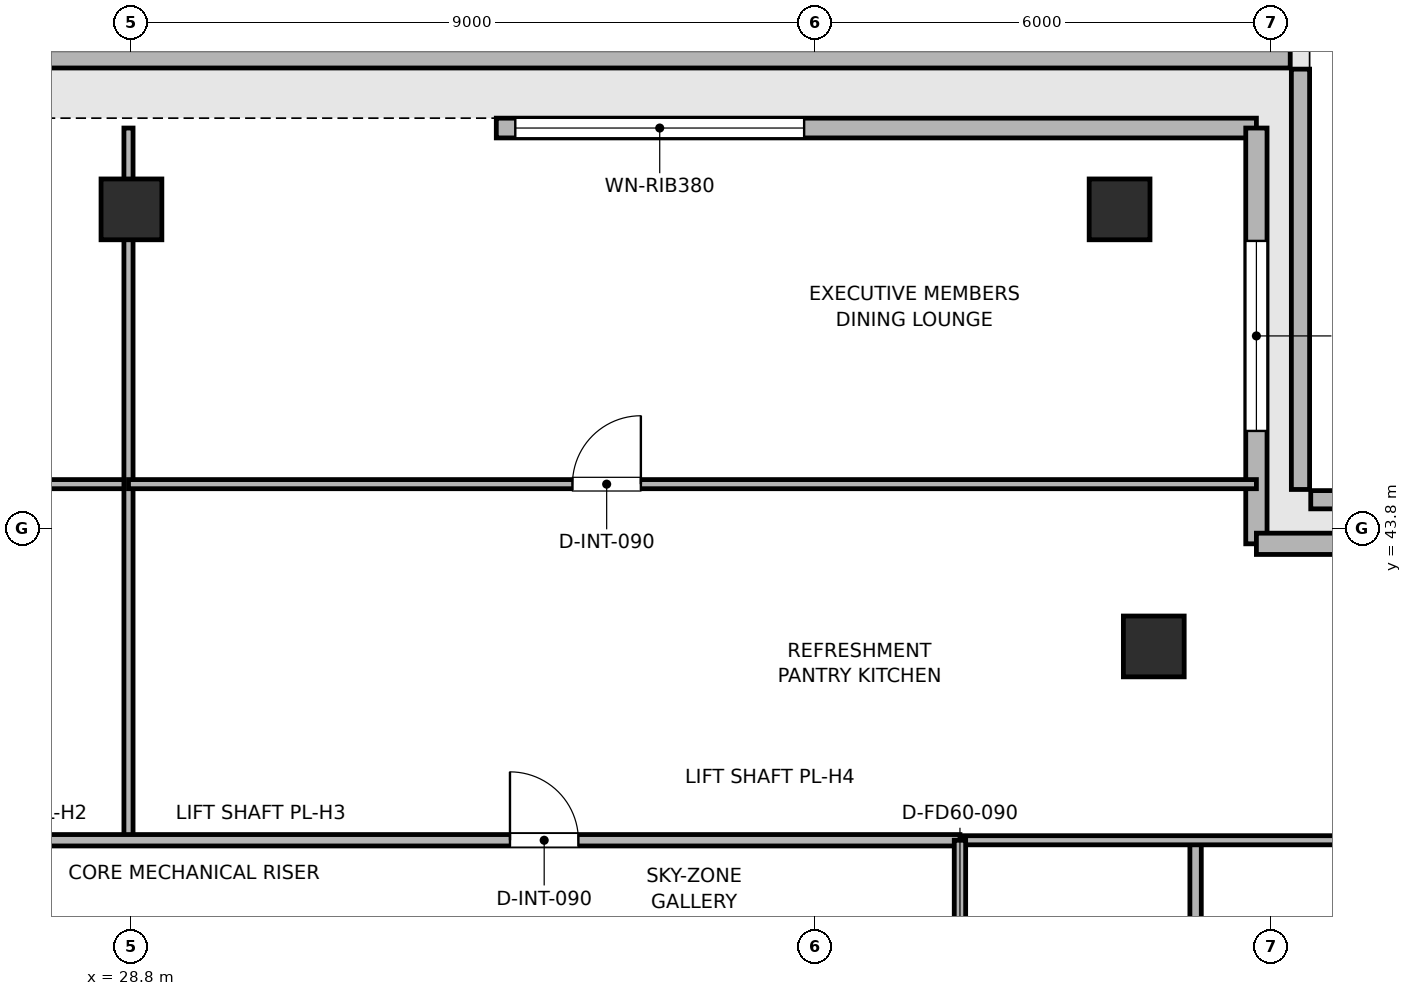
"""IFC4 building model, lengths in metres.
Left out: names, types, materials, properties, quantities, classifications, styles, units other than length and angle.
Written with IfcOpenShell. Run it as: python <this file> out.ifc"""

import sys

from ifc_helpers import new_model, si_unit, direction, frame, frame_2d, origin, origin_2d, place, context, subcontext, project, spatial, rectangle, extrude, element, fill, save


model = new_model("IFC4")
c1 = context("Model", 3, precision=1e-05, world=origin(), true_north=direction((0.0, 1.0)))
c2 = subcontext(c1, "Body", "Model", "MODEL_VIEW")
j1 = project(units=[si_unit("LENGTHUNIT", "METRE"), si_unit("PLANEANGLEUNIT", "RADIAN")], contexts=[c1])
p1 = place(None, origin())
s1 = spatial("IfcSite", under=j1, at=p1, CompositionType="ELEMENT")
p2 = place(p1, origin())
s2 = spatial("IfcBuilding", under=s1, at=p2, CompositionType="ELEMENT")
p3 = place(p2, frame((0.0, 0.0, 355.5)))
s3 = spatial("IfcBuildingStorey", under=s2, at=p3, CompositionType="ELEMENT", Elevation=355.5)
for number, where, z_axis, x_axis in (
    (1, (41.8, 48.0, 0.003), (0.0, 0.0, 1.0), (1.0, 0.0, 0.0)),
    (2, (28.8, 48.0, 0.003), (0.0, 0.0, 1.0), (1.0, 0.0, 0.0)),
    (3, (42.25, 42.25, 0.003), (0.0, 0.0, 1.0), (1.0, 0.0, 0.0)),
):
    element("IfcColumn", number, at=place(p3, frame(where, z_axis=z_axis, x_axis=x_axis)), inside=s3, PredefinedType="COLUMN", context=c2, shape_type="SweptSolid", body=[
        extrude(rectangle(XDim=0.8, YDim=0.8, at=origin_2d()), origin(), (0.0, 0.0, 1.0), 4.234),
    ])
for number, where, z_axis, x_axis in (
    (4, (49.845, 44.18, 0.0), (0.0, 0.0, 1.0), (-1.0, 0.0, 0.0)),
    (5, (44.18, 44.315, 0.0), (0.0, 0.0, 1.0), (0.0, 1.0, 0.0)),
):
    element("IfcWall", number, at=place(p3, frame(where, z_axis=z_axis, x_axis=x_axis)), inside=s3, PredefinedType="PARAPET", context=c2, shape_type="SweptSolid", body=[
        extrude(rectangle(XDim=5.53, YDim=0.24, at=frame_2d((2.765, 0.0))), origin(), (0.0, 0.0, 1.0), 1.2),
    ])
p4 = place(p3, frame((44.045, 49.98, 0.0), z_axis=(0.0, 0.0, 1.0), x_axis=(-1.0, 0.0, 0.0)))
e6 = element("IfcWall", 6, at=p4, inside=s3, PredefinedType="PARAPET", context=c2, shape_type="SweptSolid", body=[
    extrude(rectangle(XDim=30.49, YDim=0.24, at=frame_2d((15.245, 0.0))), origin(), (0.0, 0.0, 1.0), 1.2),
])
p5 = place(p3, frame((33.6, 49.07, 0.0), z_axis=(0.0, 0.0, 1.0), x_axis=(1.0, 0.0, 0.0)))
e7 = element("IfcWall", 7, at=p5, inside=s3, PredefinedType="SOLIDWALL", context=c2, shape_type="SweptSolid", body=[
    extrude(rectangle(XDim=10.0, YDim=0.26, at=frame_2d((5.0, 0.0))), origin(), (0.0, 0.0, 1.0), 4.24),
])
p6 = place(p5, frame((0.25, 0.0, 0.9)))
e8 = element("IfcOpeningElement", 8, at=p6, cuts=e7, PredefinedType="OPENING", context=c2, shape_type="SweptSolid", body=[
    extrude(rectangle(XDim=3.8, YDim=1.9, at=frame_2d((1.9, 0.95))), frame((0.0, 0.14, 0.0), z_axis=(0.0, -1.0, 0.0), x_axis=(1.0, 0.0, 0.0)), (0.0, 0.0, 1.0), 0.28),
])
p7 = place(p3, frame((43.6, 49.07, 0.0), z_axis=(0.0, 0.0, 1.0), x_axis=(0.0, -1.0, 0.0)))
e9 = element("IfcWall", 9, at=p7, inside=s3, PredefinedType="SOLIDWALL", context=c2, shape_type="SweptSolid", body=[
    extrude(rectangle(XDim=5.47, YDim=0.28, at=frame_2d((2.735, 0.0))), origin(), (0.0, 0.0, 1.0), 4.24),
])
p8 = place(p7, frame((1.485, 0.0, 0.9)))
e10 = element("IfcOpeningElement", 10, at=p8, cuts=e9, PredefinedType="OPENING", context=c2, shape_type="SweptSolid", body=[
    extrude(rectangle(XDim=2.5, YDim=1.9, at=frame_2d((1.25, 0.95))), frame((0.0, 0.15, 0.0), z_axis=(0.0, -1.0, 0.0), x_axis=(1.0, 0.0, 0.0)), (0.0, 0.0, 1.0), 0.3),
])
p9 = place(p3, frame((43.6, 43.6, 0.0), z_axis=(0.0, 0.0, 1.0), x_axis=(1.0, 0.0, 0.0)))
e11 = element("IfcWall", 11, at=p9, inside=s3, PredefinedType="SOLIDWALL", context=c2, shape_type="SweptSolid", body=[
    extrude(rectangle(XDim=5.47, YDim=0.28, at=frame_2d((2.735, 0.0))), origin(), (0.0, 0.0, 1.0), 4.24),
])
p10 = place(p9, frame((1.485, 0.0, 0.9)))
e12 = element("IfcOpeningElement", 12, at=p10, cuts=e11, PredefinedType="OPENING", context=c2, shape_type="SweptSolid", body=[
    extrude(rectangle(XDim=2.5, YDim=1.9, at=frame_2d((1.25, 0.95))), frame((0.0, 0.15, 0.0), z_axis=(0.0, -1.0, 0.0), x_axis=(1.0, 0.0, 0.0)), (0.0, 0.0, 1.0), 0.3),
])
p11 = place(p3, frame((20.33, 44.385, 0.0), z_axis=(0.0, 0.0, 1.0), x_axis=(1.0, 0.0, 0.0)))
e13 = element("IfcWall", 13, at=p11, inside=s3, PredefinedType="PARTITIONING", context=c2, shape_type="SweptSolid", body=[
    extrude(rectangle(XDim=8.431, YDim=0.12, at=frame_2d((4.215, 0.0))), origin(), (0.0, 0.0, 1.0), 3.825),
])
p12 = place(p11, frame((1.686, 0.0, 0.0)))
e14 = element("IfcOpeningElement", 14, at=p12, cuts=e13, PredefinedType="OPENING", context=c2, shape_type="SweptSolid", body=[
    extrude(rectangle(XDim=0.9, YDim=2.1, at=frame_2d((0.45, 1.05))), frame((0.0, 0.07, 0.0), z_axis=(0.0, -1.0, 0.0), x_axis=(1.0, 0.0, 0.0)), (0.0, 0.0, 1.0), 0.14),
])
p13 = place(p3, frame((28.761, 39.7, 0.0), z_axis=(0.0, 0.0, 1.0), x_axis=(0.0, 1.0, 0.0)))
e15 = element("IfcWall", 15, at=p13, inside=s3, PredefinedType="PARTITIONING", context=c2, shape_type="SweptSolid", body=[
    extrude(rectangle(XDim=9.37, YDim=0.12, at=frame_2d((4.685, 0.0))), origin(), (0.0, 0.0, 1.0), 3.825),
])
p14 = place(p3, frame((28.761, 44.385, 0.0), z_axis=(0.0, 0.0, 1.0), x_axis=(1.0, 0.0, 0.0)))
e16 = element("IfcWall", 16, at=p14, inside=s3, PredefinedType="PARTITIONING", context=c2, shape_type="SweptSolid", body=[
    extrude(rectangle(XDim=14.839, YDim=0.12, at=frame_2d((7.419, 0.0))), origin(), (0.0, 0.0, 1.0), 3.825),
])
p15 = place(p14, frame((5.841, 0.0, 0.0)))
e17 = element("IfcOpeningElement", 17, at=p15, cuts=e16, PredefinedType="OPENING", context=c2, shape_type="SweptSolid", body=[
    extrude(rectangle(XDim=0.9, YDim=2.1, at=frame_2d((0.45, 1.05))), frame((0.0, 0.07, 0.0), z_axis=(0.0, -1.0, 0.0), x_axis=(1.0, 0.0, 0.0)), (0.0, 0.0, 1.0), 0.14),
])
p16 = place(p3, frame((42.8, 28.0, 0.0), z_axis=(0.0, 0.0, 1.0), x_axis=(0.0, 1.0, 0.0)))
e18 = element("IfcWall", 18, at=p16, inside=s3, PredefinedType="PARTITIONING", context=c2, shape_type="SweptSolid", body=[
    extrude(rectangle(XDim=11.7, YDim=0.15, at=frame_2d((5.85, 0.0))), origin(), (0.0, 0.0, 1.0), 3.825),
])
p17 = place(p16, frame((9.6, 0.0, 0.0)))
e19 = element("IfcOpeningElement", 19, at=p17, cuts=e18, PredefinedType="OPENING", context=c2, shape_type="SweptSolid", body=[
    extrude(rectangle(XDim=0.9, YDim=2.1, at=frame_2d((0.45, 1.05))), frame((0.0, 0.085, 0.0), z_axis=(0.0, -1.0, 0.0), x_axis=(1.0, 0.0, 0.0)), (0.0, 0.0, 1.0), 0.17),
])
p18 = place(p3, frame((39.7, 39.7, 0.0), z_axis=(0.0, 0.0, 1.0), x_axis=(1.0, 0.0, 0.0)))
e20 = element("IfcWall", 20, at=p18, inside=s3, PredefinedType="PARTITIONING", context=c2, shape_type="SweptSolid", body=[
    extrude(rectangle(XDim=9.37, YDim=0.12, at=frame_2d((4.685, 0.0))), origin(), (0.0, 0.0, 1.0), 3.825),
])
p19 = place(p3, frame((17.9, 39.7, 0.0), z_axis=(0.0, 0.0, 1.0), x_axis=(1.0, 0.0, 0.0)))
e21 = element("IfcWall", 21, at=p19, inside=s3, PredefinedType="PARTITIONING", context=c2, shape_type="SweptSolid", body=[
    extrude(rectangle(XDim=21.8, YDim=0.15, at=frame_2d((10.9, 0.0))), origin(), (0.0, 0.0, 1.0), 3.825),
])
p20 = place(p19, frame((0.765, 0.0, 0.0)))
e22 = element("IfcOpeningElement", 22, at=p20, cuts=e21, PredefinedType="OPENING", context=c2, shape_type="SweptSolid", body=[
    extrude(rectangle(XDim=0.9, YDim=2.1, at=frame_2d((0.45, 1.05))), frame((0.0, 0.085, 0.0), z_axis=(0.0, -1.0, 0.0), x_axis=(1.0, 0.0, 0.0)), (0.0, 0.0, 1.0), 0.17),
])
p21 = place(p19, frame((6.195, 0.0, 0.0)))
e23 = element("IfcOpeningElement", 23, at=p21, cuts=e21, PredefinedType="OPENING", context=c2, shape_type="SweptSolid", body=[
    extrude(rectangle(XDim=0.9, YDim=2.1, at=frame_2d((0.45, 1.05))), frame((0.0, 0.085, 0.0), z_axis=(0.0, -1.0, 0.0), x_axis=(1.0, 0.0, 0.0)), (0.0, 0.0, 1.0), 0.17),
])
p22 = place(p19, frame((15.88, 0.0, 0.0)))
e24 = element("IfcOpeningElement", 24, at=p22, cuts=e21, PredefinedType="OPENING", context=c2, shape_type="SweptSolid", body=[
    extrude(rectangle(XDim=0.9, YDim=2.1, at=frame_2d((0.45, 1.05))), frame((0.0, 0.085, 0.0), z_axis=(0.0, -1.0, 0.0), x_axis=(1.0, 0.0, 0.0)), (0.0, 0.0, 1.0), 0.17),
])
p23 = place(p3, frame((39.7, 24.4, 0.0), z_axis=(0.0, 0.0, 1.0), x_axis=(0.0, 1.0, 0.0)))
e25 = element("IfcWall", 25, at=p23, inside=s3, PredefinedType="PARTITIONING", context=c2, shape_type="SweptSolid", body=[
    extrude(rectangle(XDim=15.3, YDim=0.15, at=frame_2d((7.65, 0.0))), origin(), (0.0, 0.0, 1.0), 3.825),
])
p24 = place(p23, frame((1.35, 0.0, 0.0)))
e26 = element("IfcOpeningElement", 26, at=p24, cuts=e25, PredefinedType="OPENING", context=c2, shape_type="SweptSolid", body=[
    extrude(rectangle(XDim=0.9, YDim=2.1, at=frame_2d((0.45, 1.05))), frame((0.0, 0.085, 0.0), z_axis=(0.0, -1.0, 0.0), x_axis=(1.0, 0.0, 0.0)), (0.0, 0.0, 1.0), 0.17),
])
p25 = place(p23, frame((4.55, 0.0, 0.0)))
e27 = element("IfcOpeningElement", 27, at=p25, cuts=e25, PredefinedType="OPENING", context=c2, shape_type="SweptSolid", body=[
    extrude(rectangle(XDim=0.9, YDim=2.1, at=frame_2d((0.45, 1.05))), frame((0.0, 0.085, 0.0), z_axis=(0.0, -1.0, 0.0), x_axis=(1.0, 0.0, 0.0)), (0.0, 0.0, 1.0), 0.17),
])
p26 = place(p23, frame((7.45, 0.0, 0.0)))
e28 = element("IfcOpeningElement", 28, at=p26, cuts=e25, PredefinedType="OPENING", context=c2, shape_type="SweptSolid", body=[
    extrude(rectangle(XDim=0.9, YDim=2.1, at=frame_2d((0.45, 1.05))), frame((0.0, 0.085, 0.0), z_axis=(0.0, -1.0, 0.0), x_axis=(1.0, 0.0, 0.0)), (0.0, 0.0, 1.0), 0.17),
])
p27 = place(p23, frame((10.2, 0.0, 0.0)))
e29 = element("IfcOpeningElement", 29, at=p27, cuts=e25, PredefinedType="OPENING", context=c2, shape_type="SweptSolid", body=[
    extrude(rectangle(XDim=0.95, YDim=2.1, at=frame_2d((0.475, 1.05))), frame((0.0, 0.085, 0.0), z_axis=(0.0, -1.0, 0.0), x_axis=(1.0, 0.0, 0.0)), (0.0, 0.0, 1.0), 0.17),
])
p28 = place(p23, frame((13.2, 0.0, 0.0)))
e30 = element("IfcOpeningElement", 30, at=p28, cuts=e25, PredefinedType="OPENING", context=c2, shape_type="SweptSolid", body=[
    extrude(rectangle(XDim=0.9, YDim=2.1, at=frame_2d((0.45, 1.05))), frame((0.0, 0.085, 0.0), z_axis=(0.0, -1.0, 0.0), x_axis=(1.0, 0.0, 0.0)), (0.0, 0.0, 1.0), 0.17),
])
p29 = place(p6, origin())
e31 = element("IfcWindow", 31, at=p29, inside=s3, PartitioningType="SINGLE_PANEL", PredefinedType="WINDOW", context=c2, shape_type="SweptSolid", body=[
    extrude(rectangle(XDim=3.8, YDim=1.9, at=frame_2d((1.9, 0.95))), frame((0.0, 0.03, 0.0), z_axis=(0.0, -1.0, 0.0), x_axis=(1.0, 0.0, 0.0)), (0.0, 0.0, 1.0), 0.06),
])
fill(e8, e31)
p30 = place(p8, origin())
e32 = element("IfcWindow", 32, at=p30, inside=s3, PartitioningType="SINGLE_PANEL", PredefinedType="WINDOW", context=c2, shape_type="SweptSolid", body=[
    extrude(rectangle(XDim=2.5, YDim=1.9, at=frame_2d((1.25, 0.95))), frame((0.0, 0.03, 0.0), z_axis=(0.0, -1.0, 0.0), x_axis=(1.0, 0.0, 0.0)), (0.0, 0.0, 1.0), 0.06),
])
fill(e10, e32)
p31 = place(p15, origin())
e33 = element("IfcDoor", 33, at=p31, inside=s3, OperationType="SINGLE_SWING_RIGHT", PredefinedType="DOOR", context=c2, shape_type="SweptSolid", body=[
    extrude(rectangle(XDim=0.9, YDim=2.1, at=frame_2d((0.45, 1.05))), frame((0.0, 0.025, 0.0), z_axis=(0.0, -1.0, 0.0), x_axis=(1.0, 0.0, 0.0)), (0.0, 0.0, 1.0), 0.05),
])
fill(e17, e33)
p32 = place(p22, origin())
e34 = element("IfcDoor", 34, at=p32, inside=s3, OperationType="SINGLE_SWING_LEFT", PredefinedType="DOOR", context=c2, shape_type="SweptSolid", body=[
    extrude(rectangle(XDim=0.9, YDim=2.1, at=frame_2d((0.45, 1.05))), frame((0.0, 0.025, 0.0), z_axis=(0.0, -1.0, 0.0), x_axis=(1.0, 0.0, 0.0)), (0.0, 0.0, 1.0), 0.05),
])
fill(e24, e34)
save(model, sys.argv[1])
